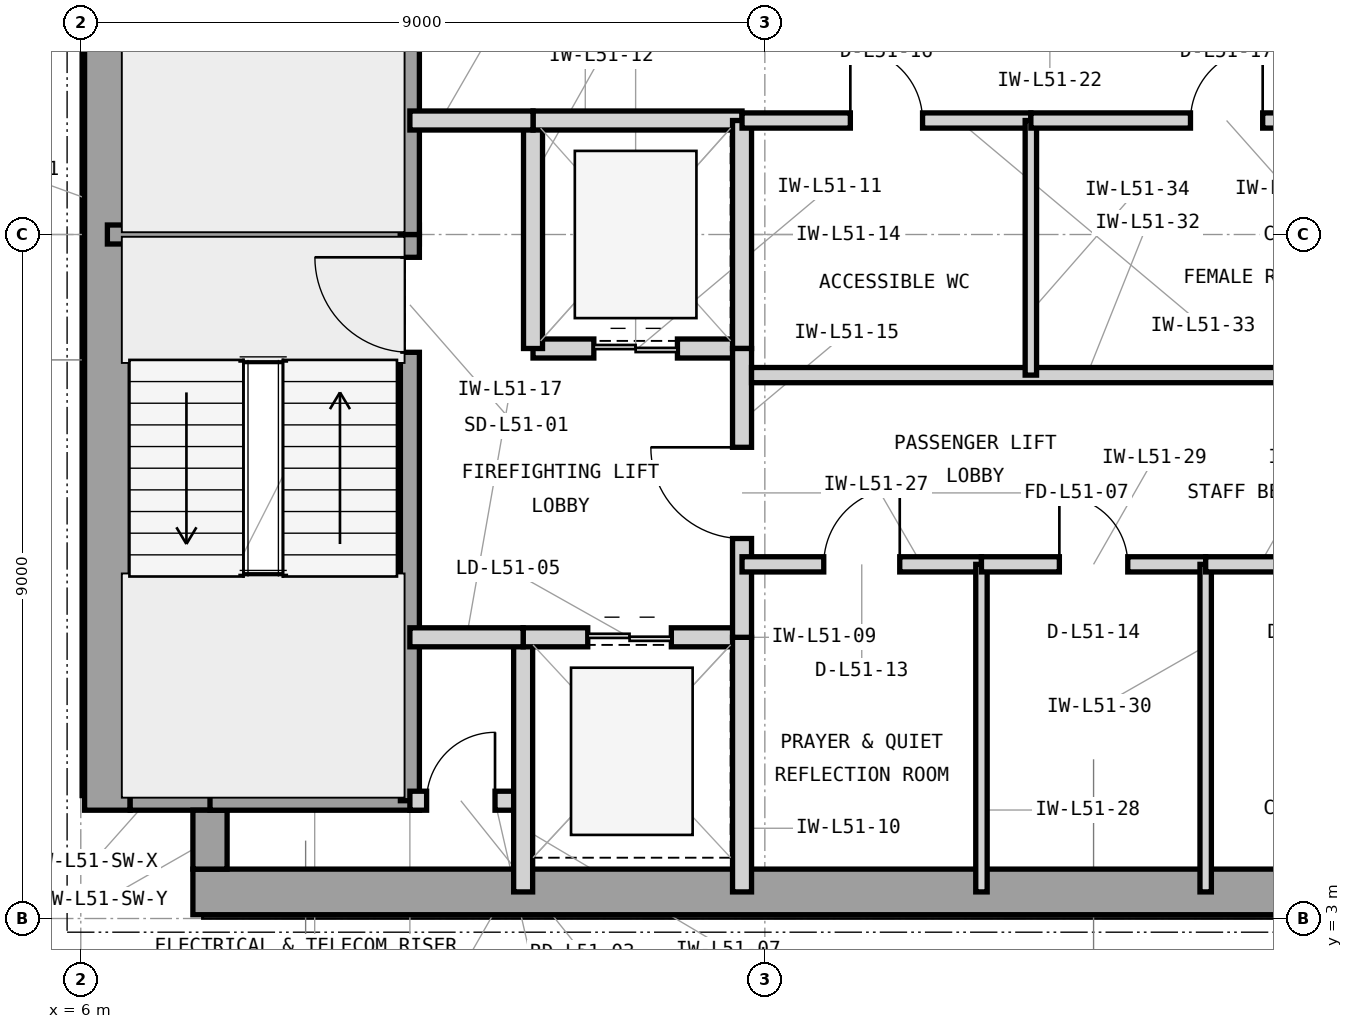
"""IFC4 building model, lengths in metres.
Left out: names, types, materials, properties, quantities, classifications, styles, units other than length and angle.
Written with IfcOpenShell. Run it as: python <this file> out.ifc"""

import sys

from ifc_helpers import new_model, si_unit, direction, frame, frame_2d, origin, place, context, subcontext, project, spatial, rectangle, extrude, element, fill, save


model = new_model("IFC4")
c1 = context("Model", 3, precision=1e-05, world=origin(), true_north=direction((0.0, 1.0)))
c2 = subcontext(c1, "Body", "Model", "MODEL_VIEW")
j1 = project(units=[si_unit("LENGTHUNIT", "METRE"), si_unit("PLANEANGLEUNIT", "RADIAN")], contexts=[c1])
p1 = place(None, origin())
s1 = spatial("IfcSite", under=j1, at=p1, CompositionType="ELEMENT")
p2 = place(p1, origin())
s2 = spatial("IfcBuilding", under=s1, at=p2, CompositionType="ELEMENT")
p3 = place(p2, frame((0.0, 0.0, 211.2)))
s3 = spatial("IfcBuildingStorey", under=s2, at=p3, CompositionType="ELEMENT", Elevation=211.2)
p4 = place(p3, frame((7.475, 3.35, 0.0), z_axis=(0.0, 0.0, 1.0), x_axis=(1.0, 0.0, 0.0)))
e1 = element("IfcWall", 1, at=p4, inside=s3, PredefinedType="SHEAR", context=c2, shape_type="SweptSolid", body=[
    extrude(rectangle(XDim=16.475, YDim=0.6, at=frame_2d((8.237, 0.0))), origin(), (0.0, 0.0, 1.0), 3.9),
])
p5 = place(p3, frame((6.35, 4.425, 0.0), z_axis=(0.0, 0.0, 1.0), x_axis=(0.0, 1.0, 0.0)))
e2 = element("IfcWall", 2, at=p5, inside=s3, PredefinedType="SHEAR", context=c2, shape_type="SweptSolid", body=[
    extrude(rectangle(XDim=15.15, YDim=0.6, at=frame_2d((7.575, 0.0))), origin(), (0.0, 0.0, 1.0), 3.9),
])
p6 = place(p3, frame((6.65, 4.65, 0.0), z_axis=(0.0, 0.0, 1.0), x_axis=(1.0, 0.0, 0.0)))
e3 = element("IfcWall", 3, at=p6, inside=s3, PredefinedType="SHEAR", context=c2, shape_type="SweptSolid", body=[
    extrude(rectangle(XDim=1.275, YDim=0.45, at=frame_2d((0.638, 0.0))), origin(), (0.0, 0.0, 1.0), 3.9),
])
p7 = place(p3, frame((7.7, 3.65, 0.0), z_axis=(0.0, 0.0, 1.0), x_axis=(0.0, 1.0, 0.0)))
e4 = element("IfcWall", 4, at=p7, inside=s3, PredefinedType="SHEAR", context=c2, shape_type="SweptSolid", body=[
    extrude(rectangle(XDim=0.775, YDim=0.45, at=frame_2d((0.388, 0.0))), origin(), (0.0, 0.0, 1.0), 3.9),
])
p8 = place(p3, frame((6.35, 12.0, 0.0), z_axis=(0.0, 0.0, 1.0), x_axis=(1.0, 0.0, 0.0)))
e5 = element("IfcWall", 5, at=p8, inside=s3, PredefinedType="SHEAR", context=c2, shape_type="SweptSolid", body=[
    extrude(rectangle(XDim=4.105, YDim=0.25, at=frame_2d((2.052, 0.0))), origin(), (0.0, 0.0, 1.0), 3.9),
])
p9 = place(p3, frame((7.7, 4.55, 0.0), z_axis=(0.0, 0.0, 1.0), x_axis=(1.0, 0.0, 0.0)))
e6 = element("IfcWall", 6, at=p9, inside=s3, PredefinedType="SHEAR", context=c2, shape_type="SweptSolid", body=[
    extrude(rectangle(XDim=2.755, YDim=0.25, at=frame_2d((1.377, 0.0))), origin(), (0.0, 0.0, 1.0), 3.9),
])
p10 = place(p3, frame((10.33, 4.55, 0.0), z_axis=(0.0, 0.0, 1.0), x_axis=(0.0, 1.0, 0.0)))
e7 = element("IfcWall", 7, at=p10, inside=s3, PredefinedType="SHEAR", context=c2, shape_type="SweptSolid", body=[
    extrude(rectangle(XDim=7.45, YDim=0.25, at=frame_2d((3.725, 0.0))), origin(), (0.0, 0.0, 1.0), 3.9),
])
p11 = place(p10, frame((5.9, 0.0, 0.0)))
e8 = element("IfcOpeningElement", 8, at=p11, cuts=e7, PredefinedType="OPENING", context=c2, shape_type="SweptSolid", body=[
    extrude(rectangle(XDim=1.25, YDim=2.2, at=frame_2d((0.625, 1.1))), frame((0.0, 0.135, 0.0), z_axis=(0.0, -1.0, 0.0), x_axis=(1.0, 0.0, 0.0)), (0.0, 0.0, 1.0), 0.27),
])
p12 = place(p3, frame((10.33, 12.0, 0.0), z_axis=(0.0, 0.0, 1.0), x_axis=(0.0, 1.0, 0.0)))
e9 = element("IfcWall", 9, at=p12, inside=s3, PredefinedType="SHEAR", context=c2, shape_type="SweptSolid", body=[
    extrude(rectangle(XDim=7.45, YDim=0.25, at=frame_2d((3.725, 0.0))), origin(), (0.0, 0.0, 1.0), 3.9),
])
p13 = place(p12, frame((5.85, 0.0, 0.0)))
e10 = element("IfcOpeningElement", 10, at=p13, cuts=e9, PredefinedType="OPENING", context=c2, shape_type="SweptSolid", body=[
    extrude(rectangle(XDim=1.25, YDim=2.2, at=frame_2d((0.625, 1.1))), frame((0.0, 0.135, 0.0), z_axis=(0.0, -1.0, 0.0), x_axis=(1.0, 0.0, 0.0)), (0.0, 0.0, 1.0), 0.27),
])
p14 = place(p3, frame((10.33, 4.55, 0.0), z_axis=(0.0, 0.0, 1.0), x_axis=(1.0, 0.0, 0.0)))
e11 = element("IfcWall", 11, at=p14, inside=s3, PredefinedType="PARTITIONING", context=c2, shape_type="SweptSolid", body=[
    extrude(rectangle(XDim=1.49, YDim=0.25, at=frame_2d((0.745, 0.0))), origin(), (0.0, 0.0, 1.0), 3.69),
])
p15 = place(p14, frame((0.22, 0.0, 0.0)))
e12 = element("IfcOpeningElement", 12, at=p15, cuts=e11, PredefinedType="OPENING", context=c2, shape_type="SweptSolid", body=[
    extrude(rectangle(XDim=0.9, YDim=2.1, at=frame_2d((0.45, 1.05))), frame((0.0, 0.135, 0.0), z_axis=(0.0, -1.0, 0.0), x_axis=(1.0, 0.0, 0.0)), (0.0, 0.0, 1.0), 0.27),
])
p16 = place(p3, frame((11.82, 3.35, 0.0), z_axis=(0.0, 0.0, 1.0), x_axis=(0.0, 1.0, 0.0)))
e13 = element("IfcWall", 13, at=p16, inside=s3, PredefinedType="PARTITIONING", context=c2, shape_type="SweptSolid", body=[
    extrude(rectangle(XDim=3.35, YDim=0.25, at=frame_2d((1.675, 0.0))), origin(), (0.0, 0.0, 1.0), 3.69),
])
p17 = place(p3, frame((11.82, 6.7, 0.0), z_axis=(0.0, 0.0, 1.0), x_axis=(1.0, 0.0, 0.0)))
e14 = element("IfcWall", 14, at=p17, inside=s3, PredefinedType="PARTITIONING", context=c2, shape_type="SweptSolid", body=[
    extrude(rectangle(XDim=2.88, YDim=0.25, at=frame_2d((1.44, 0.0))), origin(), (0.0, 0.0, 1.0), 3.283),
])
p18 = place(p17, frame((0.85, 0.0, 0.0)))
e15 = element("IfcOpeningElement", 15, at=p18, cuts=e14, PredefinedType="OPENING", context=c2, shape_type="SweptSolid", body=[
    extrude(rectangle(XDim=1.1, YDim=2.25, at=frame_2d((0.55, 1.125))), frame((0.0, 0.135, 0.0), z_axis=(0.0, -1.0, 0.0), x_axis=(1.0, 0.0, 0.0)), (0.0, 0.0, 1.0), 0.27),
])
p19 = place(p3, frame((14.7, 3.35, 0.0), z_axis=(0.0, 0.0, 1.0), x_axis=(0.0, 1.0, 0.0)))
e16 = element("IfcWall", 16, at=p19, inside=s3, PredefinedType="PARTITIONING", context=c2, shape_type="SweptSolid", body=[
    extrude(rectangle(XDim=3.35, YDim=0.25, at=frame_2d((1.675, 0.0))), origin(), (0.0, 0.0, 1.0), 3.69),
])
p20 = place(p3, frame((11.95, 10.5, 0.0), z_axis=(0.0, 0.0, 1.0), x_axis=(1.0, 0.0, 0.0)))
e17 = element("IfcWall", 17, at=p20, inside=s3, PredefinedType="PARTITIONING", context=c2, shape_type="SweptSolid", body=[
    extrude(rectangle(XDim=2.75, YDim=0.25, at=frame_2d((1.375, 0.0))), origin(), (0.0, 0.0, 1.0), 3.283),
])
p21 = place(p20, frame((0.8, 0.0, 0.0)))
e18 = element("IfcOpeningElement", 18, at=p21, cuts=e17, PredefinedType="OPENING", context=c2, shape_type="SweptSolid", body=[
    extrude(rectangle(XDim=1.1, YDim=2.25, at=frame_2d((0.55, 1.125))), frame((0.0, 0.135, 0.0), z_axis=(0.0, -1.0, 0.0), x_axis=(1.0, 0.0, 0.0)), (0.0, 0.0, 1.0), 0.27),
])
p22 = place(p3, frame((11.95, 10.5, 0.0), z_axis=(0.0, 0.0, 1.0), x_axis=(0.0, 1.0, 0.0)))
e19 = element("IfcWall", 19, at=p22, inside=s3, PredefinedType="PARTITIONING", context=c2, shape_type="SweptSolid", body=[
    extrude(rectangle(XDim=3.0, YDim=0.25, at=frame_2d((1.5, 0.0))), origin(), (0.0, 0.0, 1.0), 3.69),
])
p23 = place(p3, frame((11.95, 13.5, 0.0), z_axis=(0.0, 0.0, 1.0), x_axis=(1.0, 0.0, 0.0)))
e20 = element("IfcWall", 20, at=p23, inside=s3, PredefinedType="PARTITIONING", context=c2, shape_type="SweptSolid", body=[
    extrude(rectangle(XDim=2.75, YDim=0.25, at=frame_2d((1.375, 0.0))), origin(), (0.0, 0.0, 1.0), 3.283),
])
p24 = place(p3, frame((14.7, 10.5, 0.0), z_axis=(0.0, 0.0, 1.0), x_axis=(0.0, 1.0, 0.0)))
e21 = element("IfcWall", 21, at=p24, inside=s3, PredefinedType="PARTITIONING", context=c2, shape_type="SweptSolid", body=[
    extrude(rectangle(XDim=3.0, YDim=0.25, at=frame_2d((1.5, 0.0))), origin(), (0.0, 0.0, 1.0), 3.69),
])
p25 = place(p3, frame((14.7, 6.7, 0.0), z_axis=(0.0, 0.0, 1.0), x_axis=(0.0, 1.0, 0.0)))
e22 = element("IfcWall", 22, at=p25, inside=s3, PredefinedType="PARTITIONING", context=c2, shape_type="SweptSolid", body=[
    extrude(rectangle(XDim=3.8, YDim=0.25, at=frame_2d((1.9, 0.0))), origin(), (0.0, 0.0, 1.0), 3.69),
])
p26 = place(p25, frame((1.3, 0.0, 0.0)))
e23 = element("IfcOpeningElement", 23, at=p26, cuts=e22, PredefinedType="OPENING", context=c2, shape_type="SweptSolid", body=[
    extrude(rectangle(XDim=1.2, YDim=2.2, at=frame_2d((0.6, 1.1))), frame((0.0, 0.135, 0.0), z_axis=(0.0, -1.0, 0.0), x_axis=(1.0, 0.0, 0.0)), (0.0, 0.0, 1.0), 0.27),
])
p27 = place(p3, frame((10.33, 13.5, 0.0), z_axis=(0.0, 0.0, 1.0), x_axis=(1.0, 0.0, 0.0)))
e24 = element("IfcWall", 24, at=p27, inside=s3, PredefinedType="PARTITIONING", context=c2, shape_type="SweptSolid", body=[
    extrude(rectangle(XDim=1.62, YDim=0.25, at=frame_2d((0.81, 0.0))), origin(), (0.0, 0.0, 1.0), 3.283),
])
p28 = place(p3, frame((10.33, 6.7, 0.0), z_axis=(0.0, 0.0, 1.0), x_axis=(1.0, 0.0, 0.0)))
e25 = element("IfcWall", 25, at=p28, inside=s3, PredefinedType="PARTITIONING", context=c2, shape_type="SweptSolid", body=[
    extrude(rectangle(XDim=1.49, YDim=0.25, at=frame_2d((0.745, 0.0))), origin(), (0.0, 0.0, 1.0), 3.283),
])
p29 = place(p3, frame((14.7, 7.66, 0.0), z_axis=(0.0, 0.0, 1.0), x_axis=(1.0, 0.0, 0.0)))
e26 = element("IfcWall", 26, at=p29, inside=s3, PredefinedType="PARTITIONING", context=c2, shape_type="SweptSolid", body=[
    extrude(rectangle(XDim=3.15, YDim=0.2, at=frame_2d((1.575, 0.0))), origin(), (0.0, 0.0, 1.0), 3.69),
])
p30 = place(p29, frame((1.075, 0.0, 0.0)))
e27 = element("IfcOpeningElement", 27, at=p30, cuts=e26, PredefinedType="OPENING", context=c2, shape_type="SweptSolid", body=[
    extrude(rectangle(XDim=1.0, YDim=2.15, at=frame_2d((0.5, 1.075))), frame((0.0, 0.11, 0.0), z_axis=(0.0, -1.0, 0.0), x_axis=(1.0, 0.0, 0.0)), (0.0, 0.0, 1.0), 0.22),
])
p31 = place(p3, frame((17.85, 3.35, 0.0), z_axis=(0.0, 0.0, 1.0), x_axis=(0.0, 1.0, 0.0)))
e28 = element("IfcWall", 28, at=p31, inside=s3, PredefinedType="PARTITIONING", context=c2, shape_type="SweptSolid", body=[
    extrude(rectangle(XDim=4.31, YDim=0.15, at=frame_2d((2.155, 0.0))), origin(), (0.0, 0.0, 1.0), 3.69),
])
p32 = place(p3, frame((17.85, 7.66, 0.0), z_axis=(0.0, 0.0, 1.0), x_axis=(1.0, 0.0, 0.0)))
e29 = element("IfcWall", 29, at=p32, inside=s3, PredefinedType="PARTITIONING", context=c2, shape_type="SweptSolid", body=[
    extrude(rectangle(XDim=2.95, YDim=0.2, at=frame_2d((1.475, 0.0))), origin(), (0.0, 0.0, 1.0), 3.69),
])
p33 = place(p32, frame((1.025, 0.0, 0.0)))
e30 = element("IfcOpeningElement", 30, at=p33, cuts=e29, PredefinedType="OPENING", context=c2, shape_type="SweptSolid", body=[
    extrude(rectangle(XDim=0.9, YDim=2.1, at=frame_2d((0.45, 1.05))), frame((0.0, 0.11, 0.0), z_axis=(0.0, -1.0, 0.0), x_axis=(1.0, 0.0, 0.0)), (0.0, 0.0, 1.0), 0.22),
])
p34 = place(p3, frame((20.8, 3.35, 0.0), z_axis=(0.0, 0.0, 1.0), x_axis=(0.0, 1.0, 0.0)))
e31 = element("IfcWall", 31, at=p34, inside=s3, PredefinedType="PARTITIONING", context=c2, shape_type="SweptSolid", body=[
    extrude(rectangle(XDim=4.31, YDim=0.15, at=frame_2d((2.155, 0.0))), origin(), (0.0, 0.0, 1.0), 3.69),
])
p35 = place(p3, frame((20.8, 7.66, 0.0), z_axis=(0.0, 0.0, 1.0), x_axis=(1.0, 0.0, 0.0)))
e32 = element("IfcWall", 32, at=p35, inside=s3, PredefinedType="PARTITIONING", context=c2, shape_type="SweptSolid", body=[
    extrude(rectangle(XDim=2.85, YDim=0.2, at=frame_2d((1.425, 0.0))), origin(), (0.0, 0.0, 1.0), 3.69),
])
p36 = place(p35, frame((0.95, 0.0, 0.0)))
e33 = element("IfcOpeningElement", 33, at=p36, cuts=e32, PredefinedType="OPENING", context=c2, shape_type="SweptSolid", body=[
    extrude(rectangle(XDim=0.95, YDim=2.1, at=frame_2d((0.475, 1.05))), frame((0.0, 0.11, 0.0), z_axis=(0.0, -1.0, 0.0), x_axis=(1.0, 0.0, 0.0)), (0.0, 0.0, 1.0), 0.22),
])
p37 = place(p3, frame((14.825, 10.15, 0.0), z_axis=(0.0, 0.0, 1.0), x_axis=(1.0, 0.0, 0.0)))
e34 = element("IfcWall", 34, at=p37, inside=s3, PredefinedType="PARTITIONING", context=c2, shape_type="SweptSolid", body=[
    extrude(rectangle(XDim=8.825, YDim=0.2, at=frame_2d((4.413, 0.0))), origin(), (0.0, 0.0, 1.0), 3.69),
])
p38 = place(p3, frame((14.7, 13.5, 0.0), z_axis=(0.0, 0.0, 1.0), x_axis=(1.0, 0.0, 0.0)))
e35 = element("IfcWall", 35, at=p38, inside=s3, PredefinedType="PARTITIONING", context=c2, shape_type="SweptSolid", body=[
    extrude(rectangle(XDim=3.8, YDim=0.2, at=frame_2d((1.9, 0.0))), origin(), (0.0, 0.0, 1.0), 3.283),
])
p39 = place(p38, frame((1.425, 0.0, 0.0)))
e36 = element("IfcOpeningElement", 36, at=p39, cuts=e35, PredefinedType="OPENING", context=c2, shape_type="SweptSolid", body=[
    extrude(rectangle(XDim=0.95, YDim=2.1, at=frame_2d((0.475, 1.05))), frame((0.0, 0.11, 0.0), z_axis=(0.0, -1.0, 0.0), x_axis=(1.0, 0.0, 0.0)), (0.0, 0.0, 1.0), 0.22),
])
p40 = place(p3, frame((18.5, 10.15, 0.0), z_axis=(0.0, 0.0, 1.0), x_axis=(0.0, 1.0, 0.0)))
e37 = element("IfcWall", 37, at=p40, inside=s3, PredefinedType="PARTITIONING", context=c2, shape_type="SweptSolid", body=[
    extrude(rectangle(XDim=3.35, YDim=0.15, at=frame_2d((1.675, 0.0))), origin(), (0.0, 0.0, 1.0), 3.69),
])
p41 = place(p3, frame((18.5, 13.5, 0.0), z_axis=(0.0, 0.0, 1.0), x_axis=(1.0, 0.0, 0.0)))
e38 = element("IfcWall", 38, at=p41, inside=s3, PredefinedType="PARTITIONING", context=c2, shape_type="SweptSolid", body=[
    extrude(rectangle(XDim=5.15, YDim=0.2, at=frame_2d((2.575, 0.0))), origin(), (0.0, 0.0, 1.0), 3.283),
])
p42 = place(p41, frame((2.1, 0.0, 0.0)))
e39 = element("IfcOpeningElement", 39, at=p42, cuts=e38, PredefinedType="OPENING", context=c2, shape_type="SweptSolid", body=[
    extrude(rectangle(XDim=0.95, YDim=2.1, at=frame_2d((0.475, 1.05))), frame((0.0, 0.11, 0.0), z_axis=(0.0, -1.0, 0.0), x_axis=(1.0, 0.0, 0.0)), (0.0, 0.0, 1.0), 0.22),
])
p43 = place(p11, origin())
e40 = element("IfcDoor", 40, at=p43, inside=s3, OperationType="SINGLE_SWING_RIGHT", PredefinedType="DOOR", context=c2, shape_type="SweptSolid", body=[
    extrude(rectangle(XDim=1.25, YDim=2.2, at=frame_2d((0.625, 1.1))), frame((0.0, 0.025, 0.0), z_axis=(0.0, -1.0, 0.0), x_axis=(1.0, 0.0, 0.0)), (0.0, 0.0, 1.0), 0.05),
])
fill(e8, e40)
p44 = place(p15, origin())
e41 = element("IfcDoor", 41, at=p44, inside=s3, OperationType="SINGLE_SWING_RIGHT", PredefinedType="TRAPDOOR", context=c2, shape_type="SweptSolid", body=[
    extrude(rectangle(XDim=0.9, YDim=2.1, at=frame_2d((0.45, 1.05))), frame((0.0, 0.025, 0.0), z_axis=(0.0, -1.0, 0.0), x_axis=(1.0, 0.0, 0.0)), (0.0, 0.0, 1.0), 0.05),
])
fill(e12, e41)
p45 = place(p18, origin())
e42 = element("IfcDoor", 42, at=p45, inside=s3, OperationType="DOUBLE_DOOR_SLIDING", PredefinedType="DOOR", context=c2, shape_type="SweptSolid", body=[
    extrude(rectangle(XDim=1.1, YDim=2.25, at=frame_2d((0.55, 1.125))), frame((0.0, 0.025, 0.0), z_axis=(0.0, -1.0, 0.0), x_axis=(1.0, 0.0, 0.0)), (0.0, 0.0, 1.0), 0.05),
])
fill(e15, e42)
p46 = place(p21, origin())
e43 = element("IfcDoor", 43, at=p46, inside=s3, OperationType="DOUBLE_DOOR_SLIDING", PredefinedType="DOOR", context=c2, shape_type="SweptSolid", body=[
    extrude(rectangle(XDim=1.1, YDim=2.25, at=frame_2d((0.55, 1.125))), frame((0.0, 0.025, 0.0), z_axis=(0.0, -1.0, 0.0), x_axis=(1.0, 0.0, 0.0)), (0.0, 0.0, 1.0), 0.05),
])
fill(e18, e43)
p47 = place(p26, origin())
e44 = element("IfcDoor", 44, at=p47, inside=s3, OperationType="SINGLE_SWING_RIGHT", PredefinedType="DOOR", context=c2, shape_type="SweptSolid", body=[
    extrude(rectangle(XDim=1.2, YDim=2.2, at=frame_2d((0.6, 1.1))), frame((0.0, 0.025, 0.0), z_axis=(0.0, -1.0, 0.0), x_axis=(1.0, 0.0, 0.0)), (0.0, 0.0, 1.0), 0.05),
])
fill(e23, e44)
p48 = place(p30, origin())
e45 = element("IfcDoor", 45, at=p48, inside=s3, OperationType="SINGLE_SWING_RIGHT", PredefinedType="DOOR", context=c2, shape_type="SweptSolid", body=[
    extrude(rectangle(XDim=1.0, YDim=2.15, at=frame_2d((0.5, 1.075))), frame((0.0, 0.025, 0.0), z_axis=(0.0, -1.0, 0.0), x_axis=(1.0, 0.0, 0.0)), (0.0, 0.0, 1.0), 0.05),
])
fill(e27, e45)
p49 = place(p33, origin())
e46 = element("IfcDoor", 46, at=p49, inside=s3, OperationType="SINGLE_SWING_LEFT", PredefinedType="TRAPDOOR", context=c2, shape_type="SweptSolid", body=[
    extrude(rectangle(XDim=0.9, YDim=2.1, at=frame_2d((0.45, 1.05))), frame((0.0, 0.025, 0.0), z_axis=(0.0, -1.0, 0.0), x_axis=(1.0, 0.0, 0.0)), (0.0, 0.0, 1.0), 0.05),
])
fill(e30, e46)
p50 = place(p39, origin())
e47 = element("IfcDoor", 47, at=p50, inside=s3, OperationType="SINGLE_SWING_LEFT", PredefinedType="DOOR", context=c2, shape_type="SweptSolid", body=[
    extrude(rectangle(XDim=0.95, YDim=2.1, at=frame_2d((0.475, 1.05))), frame((0.0, 0.025, 0.0), z_axis=(0.0, -1.0, 0.0), x_axis=(1.0, 0.0, 0.0)), (0.0, 0.0, 1.0), 0.05),
])
fill(e36, e47)
p51 = place(p42, origin())
e48 = element("IfcDoor", 48, at=p51, inside=s3, OperationType="SINGLE_SWING_RIGHT", PredefinedType="DOOR", context=c2, shape_type="SweptSolid", body=[
    extrude(rectangle(XDim=0.95, YDim=2.1, at=frame_2d((0.475, 1.05))), frame((0.0, 0.025, 0.0), z_axis=(0.0, -1.0, 0.0), x_axis=(1.0, 0.0, 0.0)), (0.0, 0.0, 1.0), 0.05),
])
fill(e39, e48)
save(model, sys.argv[1])
